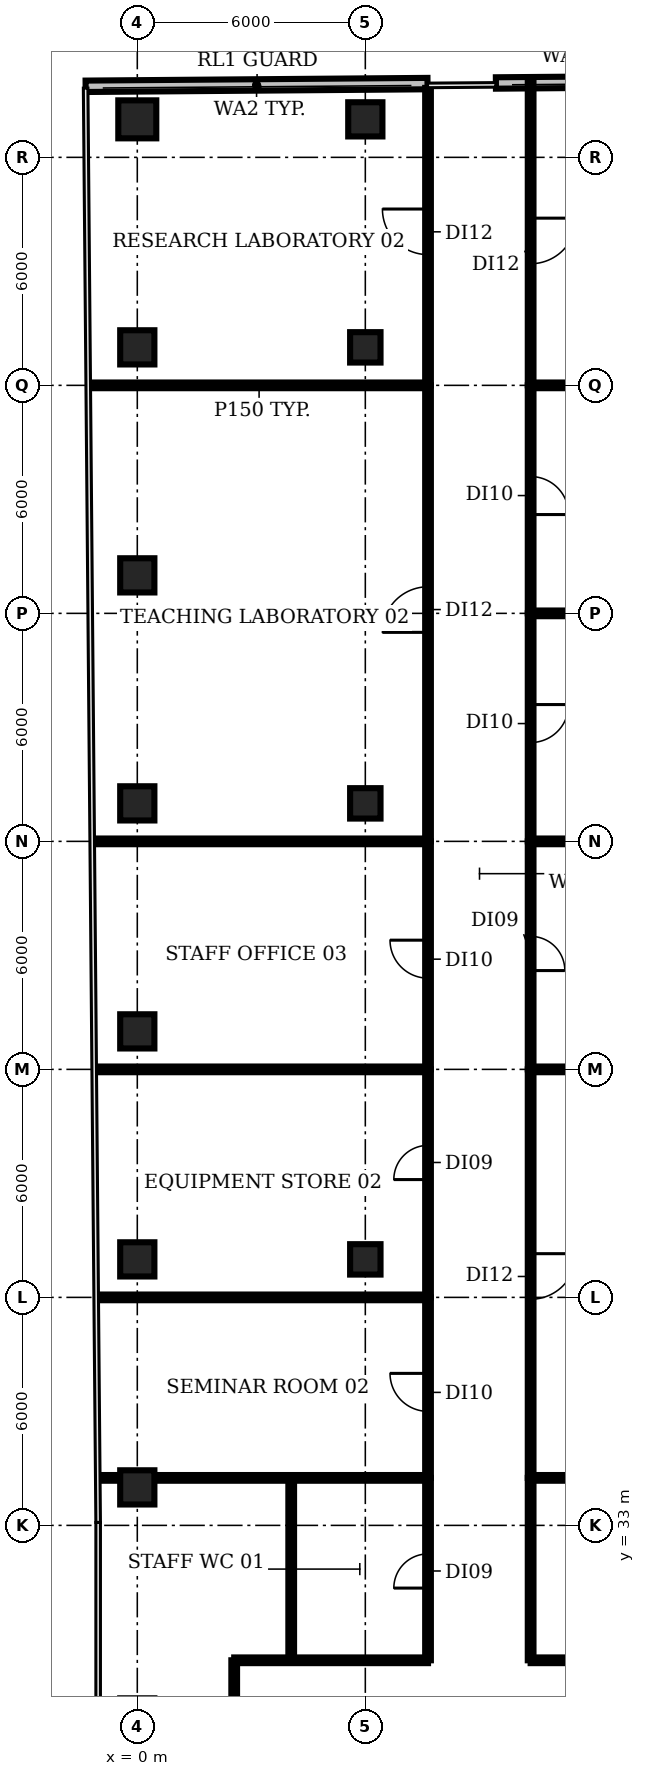
"""IFC4 building model, lengths in metres.
Left out: names, types, materials, properties, quantities, classifications, styles, units other than length and angle.
Written with IfcOpenShell. Run it as: python <this file> out.ifc"""

import sys

from ifc_helpers import new_model, si_unit, direction, frame, frame_2d, origin, origin_2d, place, context, subcontext, project, spatial, rectangle, circle, extrude, element, fill, save


model = new_model("IFC4")
c1 = context("Model", 3, precision=1e-05, world=origin(), true_north=direction((0.0, 1.0)))
c2 = subcontext(c1, "Body", "Model", "MODEL_VIEW")
j1 = project(units=[si_unit("LENGTHUNIT", "METRE"), si_unit("PLANEANGLEUNIT", "RADIAN")], contexts=[c1])
p1 = place(None, origin())
s1 = spatial("IfcSite", under=j1, at=p1, CompositionType="ELEMENT")
p2 = place(p1, origin())
s2 = spatial("IfcBuilding", under=s1, at=p2, CompositionType="ELEMENT")
p3 = place(p2, frame((0.0, 0.0, 108.8)))
s3 = spatial("IfcBuildingStorey", under=s2, at=p3, CompositionType="ELEMENT", Elevation=108.8)
for number, where, z_axis, x_axis in (
    (1, (0.0, 34.0, 0.0), (0.0, 0.0, 1.0), (1.0, 0.0, 0.0)),
    (2, (0.0, 40.0, 0.0), (0.0, 0.0, 1.0), (1.0, 0.0, 0.0)),
    (3, (0.0, 46.0, 0.0), (0.0, 0.0, 1.0), (1.0, 0.0, 0.0)),
    (4, (0.0, 52.0, 0.0), (0.0, 0.0, 1.0), (1.0, 0.0, 0.0)),
    (5, (0.0, 58.0, 0.0), (0.0, 0.0, 1.0), (1.0, 0.0, 0.0)),
    (6, (0.0, 64.0, 0.0), (0.0, 0.0, 1.0), (1.0, 0.0, 0.0)),
):
    element("IfcColumn", number, at=place(p3, frame(where, z_axis=z_axis, x_axis=x_axis)), inside=s3, PredefinedType="COLUMN", context=c2, shape_type="SweptSolid", body=[
        extrude(rectangle(XDim=0.9, YDim=0.9, at=origin_2d()), origin(), (0.0, 0.0, 1.0), 3.85),
    ])
p4 = place(p3, frame((0.0, 70.0, 0.0), z_axis=(0.0, 0.0, 1.0), x_axis=(1.0, 0.0, 0.0)))
e7 = element("IfcColumn", 7, at=p4, inside=s3, PredefinedType="COLUMN", context=c2, shape_type="SweptSolid", body=[
    extrude(circle(Radius=0.5, at=origin_2d()), origin(), (0.0, 0.0, 1.0), 3.85),
])
for number, where, z_axis, x_axis in (
    (8, (6.0, 40.0, 0.0), (0.0, 0.0, 1.0), (1.0, 0.0, 0.0)),
    (9, (6.0, 52.0, 0.0), (0.0, 0.0, 1.0), (1.0, 0.0, 0.0)),
    (10, (6.0, 64.0, 0.0), (0.0, 0.0, 1.0), (1.0, 0.0, 0.0)),
):
    element("IfcColumn", number, at=place(p3, frame(where, z_axis=z_axis, x_axis=x_axis)), inside=s3, PredefinedType="COLUMN", context=c2, shape_type="SweptSolid", body=[
        extrude(rectangle(XDim=0.8, YDim=0.8, at=origin_2d()), origin(), (0.0, 0.0, 1.0), 3.85),
    ])
p5 = place(p3, frame((6.0, 70.0, 0.0), z_axis=(0.0, 0.0, 1.0), x_axis=(1.0, 0.0, 0.0)))
e11 = element("IfcColumn", 11, at=p5, inside=s3, PredefinedType="COLUMN", context=c2, shape_type="SweptSolid", body=[
    extrude(rectangle(XDim=0.9, YDim=0.9, at=origin_2d()), origin(), (0.0, 0.0, 1.0), 3.85),
])
p6 = place(p3, frame((14.234, 70.995, 0.0), z_axis=(0.0, 0.0, 1.0), x_axis=(-0.999968890859, -0.007887795322, 0.0)))
e12 = element("IfcWall", 12, at=p6, inside=s3, PredefinedType="SOLIDWALL", context=c2, shape_type="SweptSolid", body=[
    extrude(rectangle(XDim=4.798, YDim=0.3, at=frame_2d((2.399, 0.0))), origin(), (0.0, 0.0, 1.0), 3.85),
])
p7 = place(p3, frame((7.636, 70.941, 0.0), z_axis=(0.0, 0.0, 1.0), x_axis=(-0.999968817723, -0.007897061603, 0.0)))
e13 = element("IfcWall", 13, at=p7, inside=s3, PredefinedType="SOLIDWALL", context=c2, shape_type="SweptSolid", body=[
    extrude(rectangle(XDim=8.996, YDim=0.3, at=frame_2d((4.498, 0.0))), origin(), (0.0, 0.0, 1.0), 3.85),
])
p8 = place(p3, frame((-1.24, 63.0, 0.0), z_axis=(0.0, 0.0, 1.0), x_axis=(1.0, 0.0, 0.0)))
e14 = element("IfcWall", 14, at=p8, inside=s3, PredefinedType="PARTITIONING", context=c2, shape_type="SweptSolid", body=[
    extrude(rectangle(XDim=8.89, YDim=0.15, at=frame_2d((4.445, 0.0))), origin(), (0.0, 0.0, 1.0), 2.83),
])
p9 = place(p3, frame((-1.14, 51.0, 0.0), z_axis=(0.0, 0.0, 1.0), x_axis=(1.0, 0.0, 0.0)))
e15 = element("IfcWall", 15, at=p9, inside=s3, PredefinedType="PARTITIONING", context=c2, shape_type="SweptSolid", body=[
    extrude(rectangle(XDim=8.79, YDim=0.15, at=frame_2d((4.395, 0.0))), origin(), (0.0, 0.0, 1.0), 2.83),
])
p10 = place(p3, frame((-1.08, 45.0, 0.0), z_axis=(0.0, 0.0, 1.0), x_axis=(1.0, 0.0, 0.0)))
e16 = element("IfcWall", 16, at=p10, inside=s3, PredefinedType="PARTITIONING", context=c2, shape_type="SweptSolid", body=[
    extrude(rectangle(XDim=8.73, YDim=0.15, at=frame_2d((4.365, 0.0))), origin(), (0.0, 0.0, 1.0), 2.83),
])
p11 = place(p3, frame((-1.03, 39.0, 0.0), z_axis=(0.0, 0.0, 1.0), x_axis=(1.0, 0.0, 0.0)))
e17 = element("IfcWall", 17, at=p11, inside=s3, PredefinedType="PARTITIONING", context=c2, shape_type="SweptSolid", body=[
    extrude(rectangle(XDim=8.68, YDim=0.15, at=frame_2d((4.34, 0.0))), origin(), (0.0, 0.0, 1.0), 2.83),
])
p12 = place(p3, frame((-0.99, 34.25, 0.0), z_axis=(0.0, 0.0, 1.0), x_axis=(1.0, 0.0, 0.0)))
e18 = element("IfcWall", 18, at=p12, inside=s3, PredefinedType="PARTITIONING", context=c2, shape_type="SweptSolid", body=[
    extrude(rectangle(XDim=8.64, YDim=0.15, at=frame_2d((4.32, 0.0))), origin(), (0.0, 0.0, 1.0), 2.83),
])
p13 = place(p3, frame((2.55, 25.55, 0.0), z_axis=(0.0, 0.0, 1.0), x_axis=(0.0, 1.0, 0.0)))
e19 = element("IfcWall", 19, at=p13, inside=s3, PredefinedType="PARTITIONING", context=c2, shape_type="SweptSolid", body=[
    extrude(rectangle(XDim=3.9, YDim=0.15, at=frame_2d((1.95, 0.0))), origin(), (0.0, 0.0, 1.0), 2.83),
])
p14 = place(p3, frame((2.55, 29.45, 0.0), z_axis=(0.0, 0.0, 1.0), x_axis=(1.0, 0.0, 0.0)))
e20 = element("IfcWall", 20, at=p14, inside=s3, PredefinedType="PARTITIONING", context=c2, shape_type="SweptSolid", body=[
    extrude(rectangle(XDim=5.1, YDim=0.15, at=frame_2d((2.55, 0.0))), origin(), (0.0, 0.0, 1.0), 2.83),
])
p15 = place(p3, frame((4.05, 29.45, 0.0), z_axis=(0.0, 0.0, 1.0), x_axis=(0.0, 1.0, 0.0)))
e21 = element("IfcWall", 21, at=p15, inside=s3, PredefinedType="PARTITIONING", context=c2, shape_type="SweptSolid", body=[
    extrude(rectangle(XDim=4.8, YDim=0.15, at=frame_2d((2.4, 0.0))), origin(), (0.0, 0.0, 1.0), 2.83),
])
p16 = place(p3, frame((7.65, 29.45, 0.0), z_axis=(0.0, 0.0, 1.0), x_axis=(0.0, 1.0, 0.0)))
e22 = element("IfcWall", 22, at=p16, inside=s3, PredefinedType="PARTITIONING", context=c2, shape_type="SweptSolid", body=[
    extrude(rectangle(XDim=4.8, YDim=0.15, at=frame_2d((2.4, 0.0))), origin(), (0.0, 0.0, 1.0), 2.83),
])
p17 = place(p16, frame((1.9, 0.0, 0.0)))
e23 = element("IfcOpeningElement", 23, at=p17, cuts=e22, PredefinedType="OPENING", context=c2, shape_type="SweptSolid", body=[
    extrude(rectangle(XDim=0.9, YDim=2.1, at=frame_2d((0.45, 1.05))), frame((0.0, 0.085, 0.0), z_axis=(0.0, -1.0, 0.0), x_axis=(1.0, 0.0, 0.0)), (0.0, 0.0, 1.0), 0.17),
])
p18 = place(p3, frame((7.65, 34.25, 0.0), z_axis=(0.0, 0.0, 1.0), x_axis=(0.0, 1.0, 0.0)))
e24 = element("IfcWall", 24, at=p18, inside=s3, PredefinedType="PARTITIONING", context=c2, shape_type="SweptSolid", body=[
    extrude(rectangle(XDim=4.75, YDim=0.15, at=frame_2d((2.375, 0.0))), origin(), (0.0, 0.0, 1.0), 2.83),
])
p19 = place(p18, frame((1.75, 0.0, 0.0)))
e25 = element("IfcOpeningElement", 25, at=p19, cuts=e24, PredefinedType="OPENING", context=c2, shape_type="SweptSolid", body=[
    extrude(rectangle(XDim=1.0, YDim=2.1, at=frame_2d((0.5, 1.05))), frame((0.0, 0.085, 0.0), z_axis=(0.0, -1.0, 0.0), x_axis=(1.0, 0.0, 0.0)), (0.0, 0.0, 1.0), 0.17),
])
p20 = place(p3, frame((7.65, 39.0, 0.0), z_axis=(0.0, 0.0, 1.0), x_axis=(0.0, 1.0, 0.0)))
e26 = element("IfcWall", 26, at=p20, inside=s3, PredefinedType="PARTITIONING", context=c2, shape_type="SweptSolid", body=[
    extrude(rectangle(XDim=6.0, YDim=0.15, at=frame_2d((3.0, 0.0))), origin(), (0.0, 0.0, 1.0), 2.83),
])
p21 = place(p20, frame((3.1, 0.0, 0.0)))
e27 = element("IfcOpeningElement", 27, at=p21, cuts=e26, PredefinedType="OPENING", context=c2, shape_type="SweptSolid", body=[
    extrude(rectangle(XDim=0.9, YDim=2.1, at=frame_2d((0.45, 1.05))), frame((0.0, 0.085, 0.0), z_axis=(0.0, -1.0, 0.0), x_axis=(1.0, 0.0, 0.0)), (0.0, 0.0, 1.0), 0.17),
])
p22 = place(p3, frame((7.65, 45.0, 0.0), z_axis=(0.0, 0.0, 1.0), x_axis=(0.0, 1.0, 0.0)))
e28 = element("IfcWall", 28, at=p22, inside=s3, PredefinedType="PARTITIONING", context=c2, shape_type="SweptSolid", body=[
    extrude(rectangle(XDim=6.0, YDim=0.15, at=frame_2d((3.0, 0.0))), origin(), (0.0, 0.0, 1.0), 2.83),
])
p23 = place(p22, frame((2.4, 0.0, 0.0)))
e29 = element("IfcOpeningElement", 29, at=p23, cuts=e28, PredefinedType="OPENING", context=c2, shape_type="SweptSolid", body=[
    extrude(rectangle(XDim=1.0, YDim=2.1, at=frame_2d((0.5, 1.05))), frame((0.0, 0.085, 0.0), z_axis=(0.0, -1.0, 0.0), x_axis=(1.0, 0.0, 0.0)), (0.0, 0.0, 1.0), 0.17),
])
p24 = place(p3, frame((7.65, 51.0, 0.0), z_axis=(0.0, 0.0, 1.0), x_axis=(0.0, 1.0, 0.0)))
e30 = element("IfcWall", 30, at=p24, inside=s3, PredefinedType="PARTITIONING", context=c2, shape_type="SweptSolid", body=[
    extrude(rectangle(XDim=12.0, YDim=0.15, at=frame_2d((6.0, 0.0))), origin(), (0.0, 0.0, 1.0), 2.83),
])
p25 = place(p24, frame((5.5, 0.0, 0.0)))
e31 = element("IfcOpeningElement", 31, at=p25, cuts=e30, PredefinedType="OPENING", context=c2, shape_type="SweptSolid", body=[
    extrude(rectangle(XDim=1.2, YDim=2.1, at=frame_2d((0.6, 1.05))), frame((0.0, 0.085, 0.0), z_axis=(0.0, -1.0, 0.0), x_axis=(1.0, 0.0, 0.0)), (0.0, 0.0, 1.0), 0.17),
])
p26 = place(p3, frame((7.65, 63.0, 0.0), z_axis=(0.0, 0.0, 1.0), x_axis=(0.0, 1.0, 0.0)))
e32 = element("IfcWall", 32, at=p26, inside=s3, PredefinedType="PARTITIONING", context=c2, shape_type="SweptSolid", body=[
    extrude(rectangle(XDim=7.828, YDim=0.15, at=frame_2d((3.914, 0.0))), origin(), (0.0, 0.0, 1.0), 2.83),
])
p27 = place(p26, frame((3.44, 0.0, 0.0)))
e33 = element("IfcOpeningElement", 33, at=p27, cuts=e32, PredefinedType="OPENING", context=c2, shape_type="SweptSolid", body=[
    extrude(rectangle(XDim=1.2, YDim=2.1, at=frame_2d((0.6, 1.05))), frame((0.0, 0.085, 0.0), z_axis=(0.0, -1.0, 0.0), x_axis=(1.0, 0.0, 0.0)), (0.0, 0.0, 1.0), 0.17),
])
p28 = place(p3, frame((10.35, 29.45, 0.0), z_axis=(0.0, 0.0, 1.0), x_axis=(0.0, 1.0, 0.0)))
e34 = element("IfcWall", 34, at=p28, inside=s3, PredefinedType="PARTITIONING", context=c2, shape_type="SweptSolid", body=[
    extrude(rectangle(XDim=4.8, YDim=0.15, at=frame_2d((2.4, 0.0))), origin(), (0.0, 0.0, 1.0), 2.83),
])
p29 = place(p3, frame((10.35, 29.45, 0.0), z_axis=(0.0, 0.0, 1.0), x_axis=(1.0, 0.0, 0.0)))
e35 = element("IfcWall", 35, at=p29, inside=s3, PredefinedType="PARTITIONING", context=c2, shape_type="SweptSolid", body=[
    extrude(rectangle(XDim=4.05, YDim=0.15, at=frame_2d((2.025, 0.0))), origin(), (0.0, 0.0, 1.0), 2.83),
])
p30 = place(p3, frame((10.35, 34.25, 0.0), z_axis=(0.0, 0.0, 1.0), x_axis=(1.0, 0.0, 0.0)))
e36 = element("IfcWall", 36, at=p30, inside=s3, PredefinedType="PARTITIONING", context=c2, shape_type="SweptSolid", body=[
    extrude(rectangle(XDim=14.8, YDim=0.15, at=frame_2d((7.4, 0.0))), origin(), (0.0, 0.0, 1.0), 2.83),
])
p31 = place(p3, frame((10.35, 45.0, 0.0), z_axis=(0.0, 0.0, 1.0), x_axis=(0.0, -1.0, 0.0)))
e37 = element("IfcWall", 37, at=p31, inside=s3, PredefinedType="PARTITIONING", context=c2, shape_type="SweptSolid", body=[
    extrude(rectangle(XDim=10.75, YDim=0.15, at=frame_2d((5.375, 0.0))), origin(), (0.0, 0.0, 1.0), 2.83),
])
p32 = place(p31, frame((4.85, 0.0, 0.0)))
e38 = element("IfcOpeningElement", 38, at=p32, cuts=e37, PredefinedType="OPENING", context=c2, shape_type="SweptSolid", body=[
    extrude(rectangle(XDim=1.2, YDim=2.1, at=frame_2d((0.6, 1.05))), frame((0.0, 0.085, 0.0), z_axis=(0.0, -1.0, 0.0), x_axis=(1.0, 0.0, 0.0)), (0.0, 0.0, 1.0), 0.17),
])
p33 = place(p3, frame((10.35, 45.0, 0.0), z_axis=(0.0, 0.0, 1.0), x_axis=(1.0, 0.0, 0.0)))
e39 = element("IfcWall", 39, at=p33, inside=s3, PredefinedType="PARTITIONING", context=c2, shape_type="SweptSolid", body=[
    extrude(rectangle(XDim=14.63, YDim=0.15, at=frame_2d((7.315, 0.0))), origin(), (0.0, 0.0, 1.0), 2.83),
])
p34 = place(p3, frame((10.35, 51.0, 0.0), z_axis=(0.0, 0.0, 1.0), x_axis=(0.0, -1.0, 0.0)))
e40 = element("IfcWall", 40, at=p34, inside=s3, PredefinedType="PARTITIONING", context=c2, shape_type="SweptSolid", body=[
    extrude(rectangle(XDim=6.0, YDim=0.15, at=frame_2d((3.0, 0.0))), origin(), (0.0, 0.0, 1.0), 2.83),
])
p35 = place(p34, frame((2.5, 0.0, 0.0)))
e41 = element("IfcOpeningElement", 41, at=p35, cuts=e40, PredefinedType="OPENING", context=c2, shape_type="SweptSolid", body=[
    extrude(rectangle(XDim=0.9, YDim=2.1, at=frame_2d((0.45, 1.05))), frame((0.0, 0.085, 0.0), z_axis=(0.0, -1.0, 0.0), x_axis=(1.0, 0.0, 0.0)), (0.0, 0.0, 1.0), 0.17),
])
p36 = place(p3, frame((10.35, 51.0, 0.0), z_axis=(0.0, 0.0, 1.0), x_axis=(1.0, 0.0, 0.0)))
e42 = element("IfcWall", 42, at=p36, inside=s3, PredefinedType="PARTITIONING", context=c2, shape_type="SweptSolid", body=[
    extrude(rectangle(XDim=14.63, YDim=0.15, at=frame_2d((7.315, 0.0))), origin(), (0.0, 0.0, 1.0), 2.83),
])
p37 = place(p3, frame((10.35, 57.0, 0.0), z_axis=(0.0, 0.0, 1.0), x_axis=(0.0, -1.0, 0.0)))
e43 = element("IfcWall", 43, at=p37, inside=s3, PredefinedType="PARTITIONING", context=c2, shape_type="SweptSolid", body=[
    extrude(rectangle(XDim=6.0, YDim=0.15, at=frame_2d((3.0, 0.0))), origin(), (0.0, 0.0, 1.0), 2.83),
])
p38 = place(p37, frame((2.4, 0.0, 0.0)))
e44 = element("IfcOpeningElement", 44, at=p38, cuts=e43, PredefinedType="OPENING", context=c2, shape_type="SweptSolid", body=[
    extrude(rectangle(XDim=1.0, YDim=2.1, at=frame_2d((0.5, 1.05))), frame((0.0, 0.085, 0.0), z_axis=(0.0, -1.0, 0.0), x_axis=(1.0, 0.0, 0.0)), (0.0, 0.0, 1.0), 0.17),
])
p39 = place(p3, frame((10.35, 57.0, 0.0), z_axis=(0.0, 0.0, 1.0), x_axis=(1.0, 0.0, 0.0)))
e45 = element("IfcWall", 45, at=p39, inside=s3, PredefinedType="PARTITIONING", context=c2, shape_type="SweptSolid", body=[
    extrude(rectangle(XDim=14.63, YDim=0.15, at=frame_2d((7.315, 0.0))), origin(), (0.0, 0.0, 1.0), 2.83),
])
p40 = place(p3, frame((10.35, 63.0, 0.0), z_axis=(0.0, 0.0, 1.0), x_axis=(0.0, -1.0, 0.0)))
e46 = element("IfcWall", 46, at=p40, inside=s3, PredefinedType="PARTITIONING", context=c2, shape_type="SweptSolid", body=[
    extrude(rectangle(XDim=6.0, YDim=0.15, at=frame_2d((3.0, 0.0))), origin(), (0.0, 0.0, 1.0), 2.83),
])
p41 = place(p40, frame((2.4, 0.0, 0.0)))
e47 = element("IfcOpeningElement", 47, at=p41, cuts=e46, PredefinedType="OPENING", context=c2, shape_type="SweptSolid", body=[
    extrude(rectangle(XDim=1.0, YDim=2.1, at=frame_2d((0.5, 1.05))), frame((0.0, 0.085, 0.0), z_axis=(0.0, -1.0, 0.0), x_axis=(1.0, 0.0, 0.0)), (0.0, 0.0, 1.0), 0.17),
])
p42 = place(p3, frame((10.35, 63.0, 0.0), z_axis=(0.0, 0.0, 1.0), x_axis=(1.0, 0.0, 0.0)))
e48 = element("IfcWall", 48, at=p42, inside=s3, PredefinedType="PARTITIONING", context=c2, shape_type="SweptSolid", body=[
    extrude(rectangle(XDim=14.63, YDim=0.15, at=frame_2d((7.315, 0.0))), origin(), (0.0, 0.0, 1.0), 2.83),
])
p43 = place(p3, frame((10.35, 70.974, 0.0), z_axis=(0.0, 0.0, 1.0), x_axis=(0.0, -1.0, 0.0)))
e49 = element("IfcWall", 49, at=p43, inside=s3, PredefinedType="PARTITIONING", context=c2, shape_type="SweptSolid", body=[
    extrude(rectangle(XDim=7.974, YDim=0.15, at=frame_2d((3.987, 0.0))), origin(), (0.0, 0.0, 1.0), 2.83),
])
p44 = place(p43, frame((3.574, 0.0, 0.0)))
e50 = element("IfcOpeningElement", 50, at=p44, cuts=e49, PredefinedType="OPENING", context=c2, shape_type="SweptSolid", body=[
    extrude(rectangle(XDim=1.2, YDim=2.1, at=frame_2d((0.6, 1.05))), frame((0.0, 0.085, 0.0), z_axis=(0.0, -1.0, 0.0), x_axis=(1.0, 0.0, 0.0)), (0.0, 0.0, 1.0), 0.17),
])
p45 = place(p17, origin())
e51 = element("IfcDoor", 51, at=p45, inside=s3, OperationType="SINGLE_SWING_LEFT", PredefinedType="DOOR", context=c2, shape_type="SweptSolid", body=[
    extrude(rectangle(XDim=0.9, YDim=2.1, at=frame_2d((0.45, 1.05))), frame((0.0, 0.025, 0.0), z_axis=(0.0, -1.0, 0.0), x_axis=(1.0, 0.0, 0.0)), (0.0, 0.0, 1.0), 0.05),
])
fill(e23, e51)
p46 = place(p19, origin())
e52 = element("IfcDoor", 52, at=p46, inside=s3, OperationType="SINGLE_SWING_RIGHT", PredefinedType="DOOR", context=c2, shape_type="SweptSolid", body=[
    extrude(rectangle(XDim=1.0, YDim=2.1, at=frame_2d((0.5, 1.05))), frame((0.0, 0.025, 0.0), z_axis=(0.0, -1.0, 0.0), x_axis=(1.0, 0.0, 0.0)), (0.0, 0.0, 1.0), 0.05),
])
fill(e25, e52)
p47 = place(p21, origin())
e53 = element("IfcDoor", 53, at=p47, inside=s3, OperationType="SINGLE_SWING_LEFT", PredefinedType="DOOR", context=c2, shape_type="SweptSolid", body=[
    extrude(rectangle(XDim=0.9, YDim=2.1, at=frame_2d((0.45, 1.05))), frame((0.0, 0.025, 0.0), z_axis=(0.0, -1.0, 0.0), x_axis=(1.0, 0.0, 0.0)), (0.0, 0.0, 1.0), 0.05),
])
fill(e27, e53)
p48 = place(p23, origin())
e54 = element("IfcDoor", 54, at=p48, inside=s3, OperationType="SINGLE_SWING_RIGHT", PredefinedType="DOOR", context=c2, shape_type="SweptSolid", body=[
    extrude(rectangle(XDim=1.0, YDim=2.1, at=frame_2d((0.5, 1.05))), frame((0.0, 0.025, 0.0), z_axis=(0.0, -1.0, 0.0), x_axis=(1.0, 0.0, 0.0)), (0.0, 0.0, 1.0), 0.05),
])
fill(e29, e54)
p49 = place(p25, origin())
e55 = element("IfcDoor", 55, at=p49, inside=s3, OperationType="SINGLE_SWING_LEFT", PredefinedType="DOOR", context=c2, shape_type="SweptSolid", body=[
    extrude(rectangle(XDim=1.2, YDim=2.1, at=frame_2d((0.6, 1.05))), frame((0.0, 0.025, 0.0), z_axis=(0.0, -1.0, 0.0), x_axis=(1.0, 0.0, 0.0)), (0.0, 0.0, 1.0), 0.05),
])
fill(e31, e55)
p50 = place(p27, origin())
e56 = element("IfcDoor", 56, at=p50, inside=s3, OperationType="SINGLE_SWING_RIGHT", PredefinedType="DOOR", context=c2, shape_type="SweptSolid", body=[
    extrude(rectangle(XDim=1.2, YDim=2.1, at=frame_2d((0.6, 1.05))), frame((0.0, 0.025, 0.0), z_axis=(0.0, -1.0, 0.0), x_axis=(1.0, 0.0, 0.0)), (0.0, 0.0, 1.0), 0.05),
])
fill(e33, e56)
p51 = place(p32, origin())
e57 = element("IfcDoor", 57, at=p51, inside=s3, OperationType="SINGLE_SWING_LEFT", PredefinedType="DOOR", context=c2, shape_type="SweptSolid", body=[
    extrude(rectangle(XDim=1.2, YDim=2.1, at=frame_2d((0.6, 1.05))), frame((0.0, 0.025, 0.0), z_axis=(0.0, -1.0, 0.0), x_axis=(1.0, 0.0, 0.0)), (0.0, 0.0, 1.0), 0.05),
])
fill(e38, e57)
p52 = place(p35, origin())
e58 = element("IfcDoor", 58, at=p52, inside=s3, OperationType="SINGLE_SWING_RIGHT", PredefinedType="DOOR", context=c2, shape_type="SweptSolid", body=[
    extrude(rectangle(XDim=0.9, YDim=2.1, at=frame_2d((0.45, 1.05))), frame((0.0, 0.025, 0.0), z_axis=(0.0, -1.0, 0.0), x_axis=(1.0, 0.0, 0.0)), (0.0, 0.0, 1.0), 0.05),
])
fill(e41, e58)
p53 = place(p38, origin())
e59 = element("IfcDoor", 59, at=p53, inside=s3, OperationType="SINGLE_SWING_LEFT", PredefinedType="DOOR", context=c2, shape_type="SweptSolid", body=[
    extrude(rectangle(XDim=1.0, YDim=2.1, at=frame_2d((0.5, 1.05))), frame((0.0, 0.025, 0.0), z_axis=(0.0, -1.0, 0.0), x_axis=(1.0, 0.0, 0.0)), (0.0, 0.0, 1.0), 0.05),
])
fill(e44, e59)
p54 = place(p41, origin())
e60 = element("IfcDoor", 60, at=p54, inside=s3, OperationType="SINGLE_SWING_RIGHT", PredefinedType="DOOR", context=c2, shape_type="SweptSolid", body=[
    extrude(rectangle(XDim=1.0, YDim=2.1, at=frame_2d((0.5, 1.05))), frame((0.0, 0.025, 0.0), z_axis=(0.0, -1.0, 0.0), x_axis=(1.0, 0.0, 0.0)), (0.0, 0.0, 1.0), 0.05),
])
fill(e47, e60)
p55 = place(p44, origin())
e61 = element("IfcDoor", 61, at=p55, inside=s3, OperationType="SINGLE_SWING_LEFT", PredefinedType="DOOR", context=c2, shape_type="SweptSolid", body=[
    extrude(rectangle(XDim=1.2, YDim=2.1, at=frame_2d((0.6, 1.05))), frame((0.0, 0.025, 0.0), z_axis=(0.0, -1.0, 0.0), x_axis=(1.0, 0.0, 0.0)), (0.0, 0.0, 1.0), 0.05),
])
fill(e50, e61)
save(model, sys.argv[1])
